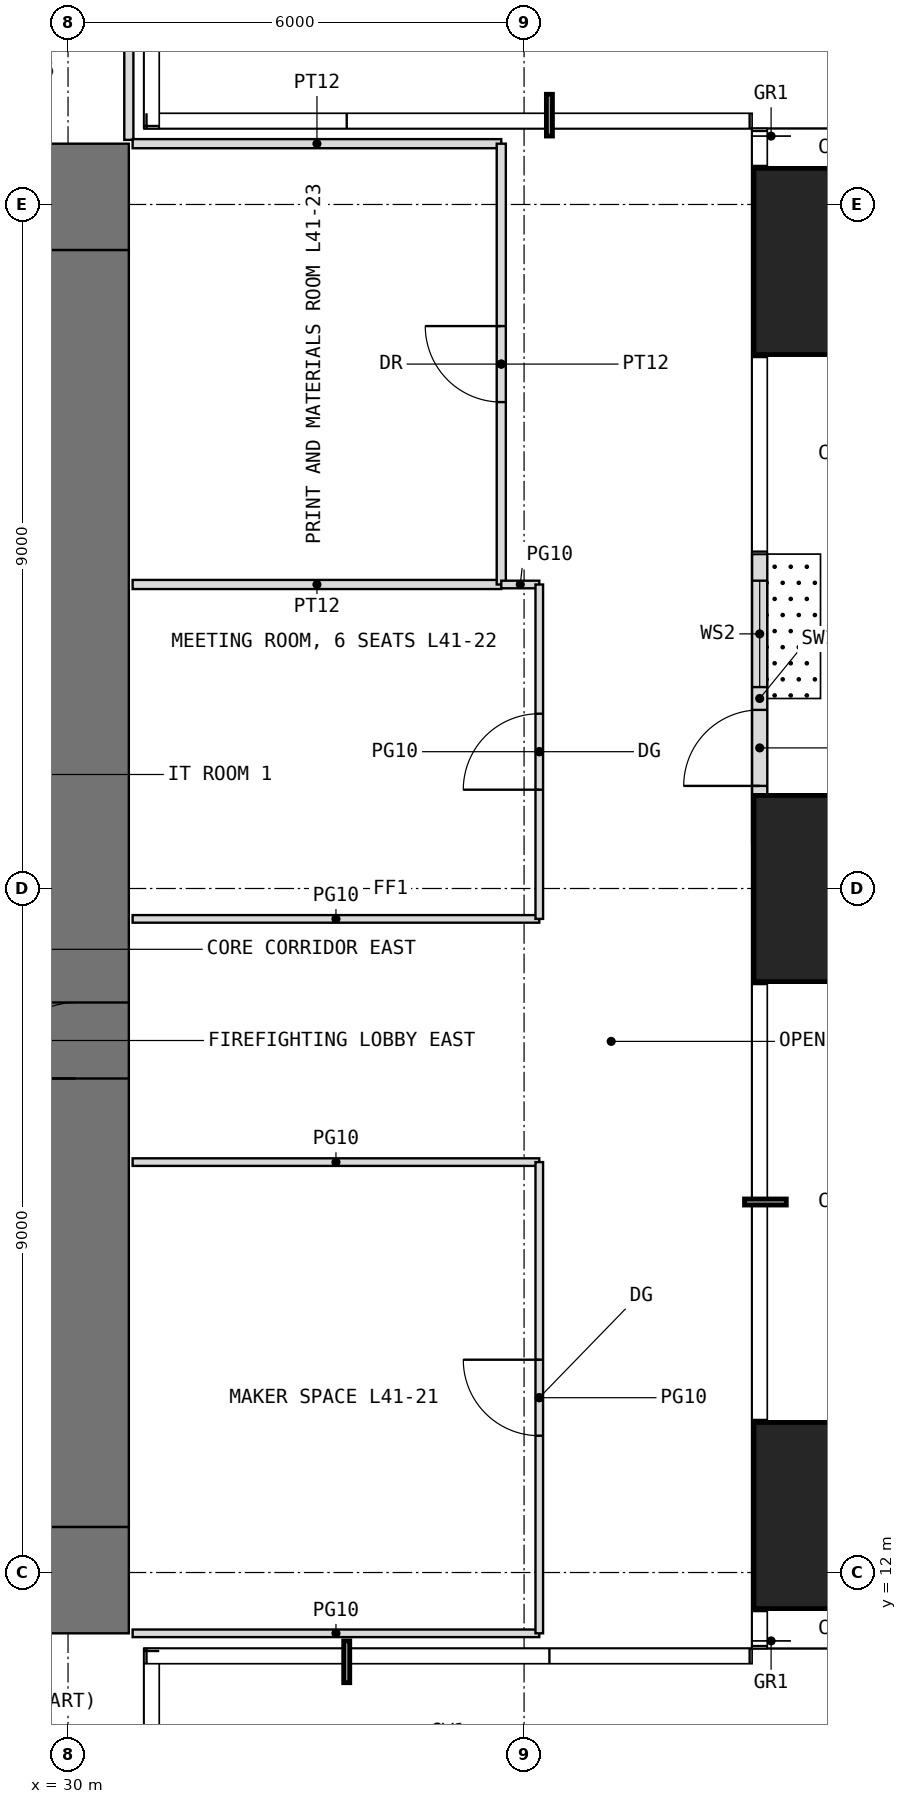
"""IFC4 building model, lengths in metres.
Left out: names, types, materials, properties, quantities, classifications, styles, units other than length and angle.
Written with IfcOpenShell. Run it as: python <this file> out.ifc"""

import sys

from ifc_helpers import new_model, si_unit, direction, frame, frame_2d, origin, origin_2d, place, context, subcontext, project, spatial, rectangle, extrude, element, fill, save


model = new_model("IFC4")
c1 = context("Model", 3, precision=1e-05, world=origin(), true_north=direction((0.0, 1.0)))
c2 = subcontext(c1, "Body", "Model", "MODEL_VIEW")
j1 = project(units=[si_unit("LENGTHUNIT", "METRE"), si_unit("PLANEANGLEUNIT", "RADIAN")], contexts=[c1])
p1 = place(None, origin())
s1 = spatial("IfcSite", under=j1, at=p1, CompositionType="ELEMENT")
p2 = place(p1, origin())
s2 = spatial("IfcBuilding", under=s1, at=p2, CompositionType="ELEMENT")
p3 = place(p2, frame((0.0, 0.0, 174.5)))
s3 = spatial("IfcBuildingStorey", under=s2, at=p3, CompositionType="ELEMENT", Elevation=174.5)
for number, where, z_axis, x_axis in (
    (1, (40.25, 12.75, 0.0), (0.0, 0.0, 1.0), (1.0, 0.0, 0.0)),
    (2, (40.25, 21.0, 0.0), (0.0, 0.0, 1.0), (1.0, 0.0, 0.0)),
    (3, (40.25, 29.25, 0.0), (0.0, 0.0, 1.0), (1.0, 0.0, 0.0)),
):
    element("IfcColumn", number, at=place(p3, frame(where, z_axis=z_axis, x_axis=x_axis)), inside=s3, PredefinedType="COLUMN", context=c2, shape_type="SweptSolid", body=[
        extrude(rectangle(XDim=2.45, YDim=2.45, at=origin_2d()), origin(), (0.0, 0.0, 1.0), 4.0),
    ])
p4 = place(p3, frame((39.1, 21.6, 0.0), z_axis=(0.0, 0.0, 1.0), x_axis=(0.0, 1.0, 0.0)))
e4 = element("IfcWall", 4, at=p4, inside=s3, PredefinedType="USERDEFINED", context=c2, shape_type="SweptSolid", body=[
    extrude(rectangle(XDim=3.8, YDim=0.2, at=frame_2d((1.9, 0.0))), origin(), (0.0, 0.0, 1.0), 3.75),
])
p5 = place(p4, frame((0.75, 0.0, 0.0)))
e5 = element("IfcOpeningElement", 5, at=p5, cuts=e4, PredefinedType="OPENING", context=c2, shape_type="SweptSolid", body=[
    extrude(rectangle(XDim=1.0, YDim=2.4, at=frame_2d((0.5, 1.2))), frame((0.0, 0.11, 0.0), z_axis=(0.0, -1.0, 0.0), x_axis=(1.0, 0.0, 0.0)), (0.0, 0.0, 1.0), 0.22),
])
p6 = place(p4, frame((2.05, 0.0, 0.3)))
e6 = element("IfcOpeningElement", 6, at=p6, cuts=e4, PredefinedType="OPENING", context=c2, shape_type="SweptSolid", body=[
    extrude(rectangle(XDim=1.4, YDim=2.7, at=frame_2d((0.7, 1.35))), frame((0.0, 0.11, 0.0), z_axis=(0.0, -1.0, 0.0), x_axis=(1.0, 0.0, 0.0)), (0.0, 0.0, 1.0), 0.22),
])
p7 = place(p3, frame((11.2, 11.9, -0.05), z_axis=(0.0, 0.0, 1.0), x_axis=(1.0, 0.0, 0.0)))
e7 = element("IfcWall", 7, at=p7, inside=s3, PredefinedType="SHEAR", context=c2, shape_type="SweptSolid", body=[
    extrude(rectangle(XDim=19.6, YDim=1.4, at=frame_2d((9.8, 0.0))), origin(), (0.0, 0.0, 1.0), 4.0),
])
p8 = place(p7, frame((8.8, 0.0, 0.05)))
e8 = element("IfcOpeningElement", 8, at=p8, cuts=e7, PredefinedType="OPENING", context=c2, shape_type="SweptSolid", body=[
    extrude(rectangle(XDim=2.0, YDim=2.2, at=frame_2d((1.0, 1.1))), frame((0.0, 0.71, 0.0), z_axis=(0.0, -1.0, 0.0), x_axis=(1.0, 0.0, 0.0)), (0.0, 0.0, 1.0), 1.42),
])
p9 = place(p3, frame((11.2, 30.1, -0.05), z_axis=(0.0, 0.0, 1.0), x_axis=(1.0, 0.0, 0.0)))
e9 = element("IfcWall", 9, at=p9, inside=s3, PredefinedType="SHEAR", context=c2, shape_type="SweptSolid", body=[
    extrude(rectangle(XDim=19.6, YDim=1.4, at=frame_2d((9.8, 0.0))), origin(), (0.0, 0.0, 1.0), 4.0),
])
p10 = place(p9, frame((8.8, 0.0, 0.05)))
e10 = element("IfcOpeningElement", 10, at=p10, cuts=e9, PredefinedType="OPENING", context=c2, shape_type="SweptSolid", body=[
    extrude(rectangle(XDim=2.0, YDim=2.2, at=frame_2d((1.0, 1.1))), frame((0.0, 0.71, 0.0), z_axis=(0.0, -1.0, 0.0), x_axis=(1.0, 0.0, 0.0)), (0.0, 0.0, 1.0), 1.42),
])
p11 = place(p3, frame((30.1, 12.6, -0.05), z_axis=(0.0, 0.0, 1.0), x_axis=(0.0, 1.0, 0.0)))
e11 = element("IfcWall", 11, at=p11, inside=s3, PredefinedType="SHEAR", context=c2, shape_type="SweptSolid", body=[
    extrude(rectangle(XDim=16.8, YDim=1.4, at=frame_2d((8.4, 0.0))), origin(), (0.0, 0.0, 1.0), 4.0),
])
p12 = place(p11, frame((5.9, 0.0, 0.05)))
e12 = element("IfcOpeningElement", 12, at=p12, cuts=e11, PredefinedType="OPENING", context=c2, shape_type="SweptSolid", body=[
    extrude(rectangle(XDim=1.0, YDim=2.2, at=frame_2d((0.5, 1.1))), frame((0.0, 0.71, 0.0), z_axis=(0.0, -1.0, 0.0), x_axis=(1.0, 0.0, 0.0)), (0.0, 0.0, 1.0), 1.42),
])
p13 = place(p3, frame((30.8, 30.85, 0.0), z_axis=(0.0, 0.0, 1.0), x_axis=(0.0, 1.0, 0.0)))
e13 = element("IfcWall", 13, at=p13, inside=s3, PredefinedType="PARTITIONING", context=c2, shape_type="SweptSolid", body=[
    extrude(rectangle(XDim=2.45, YDim=0.12, at=frame_2d((1.225, 0.0))), origin(), (0.0, 0.0, 1.0), 3.75),
])
for number, where, z_axis, x_axis in (
    (14, (30.85, 11.2, 0.0), (0.0, 0.0, 1.0), (1.0, 0.0, 0.0)),
    (15, (30.85, 17.4, 0.0), (0.0, 0.0, 1.0), (1.0, 0.0, 0.0)),
    (16, (30.85, 20.6, 0.0), (0.0, 0.0, 1.0), (1.0, 0.0, 0.0)),
):
    element("IfcWall", number, at=place(p3, frame(where, z_axis=z_axis, x_axis=x_axis)), inside=s3, PredefinedType="PARTITIONING", context=c2, shape_type="SweptSolid", body=[
        extrude(rectangle(XDim=5.35, YDim=0.1, at=frame_2d((2.675, 0.0))), origin(), (0.0, 0.0, 1.0), 3.75),
    ])
for number, where, z_axis, x_axis in (
    (17, (30.85, 25.0, 0.0), (0.0, 0.0, 1.0), (1.0, 0.0, 0.0)),
    (18, (30.85, 30.8, 0.0), (0.0, 0.0, 1.0), (1.0, 0.0, 0.0)),
):
    element("IfcWall", number, at=place(p3, frame(where, z_axis=z_axis, x_axis=x_axis)), inside=s3, PredefinedType="PARTITIONING", context=c2, shape_type="SweptSolid", body=[
        extrude(rectangle(XDim=4.85, YDim=0.12, at=frame_2d((2.425, 0.0))), origin(), (0.0, 0.0, 1.0), 3.75),
    ])
p14 = place(p3, frame((35.7, 25.0, 0.0), z_axis=(0.0, 0.0, 1.0), x_axis=(0.0, 1.0, 0.0)))
e19 = element("IfcWall", 19, at=p14, inside=s3, PredefinedType="PARTITIONING", context=c2, shape_type="SweptSolid", body=[
    extrude(rectangle(XDim=5.8, YDim=0.12, at=frame_2d((2.9, 0.0))), origin(), (0.0, 0.0, 1.0), 3.75),
])
p15 = place(p14, frame((2.4, 0.0, 0.0)))
e20 = element("IfcOpeningElement", 20, at=p15, cuts=e19, PredefinedType="OPENING", context=c2, shape_type="SweptSolid", body=[
    extrude(rectangle(XDim=1.0, YDim=2.2, at=frame_2d((0.5, 1.1))), frame((0.0, 0.07, 0.0), z_axis=(0.0, -1.0, 0.0), x_axis=(1.0, 0.0, 0.0)), (0.0, 0.0, 1.0), 0.14),
])
p16 = place(p3, frame((35.7, 25.0, 0.0), z_axis=(0.0, 0.0, 1.0), x_axis=(1.0, 0.0, 0.0)))
e21 = element("IfcWall", 21, at=p16, inside=s3, PredefinedType="PARTITIONING", context=c2, shape_type="SweptSolid", body=[
    extrude(rectangle(XDim=0.5, YDim=0.1, at=frame_2d((0.25, 0.0))), origin(), (0.0, 0.0, 1.0), 3.75),
])
p17 = place(p3, frame((36.2, 11.2, 0.0), z_axis=(0.0, 0.0, 1.0), x_axis=(0.0, 1.0, 0.0)))
e22 = element("IfcWall", 22, at=p17, inside=s3, PredefinedType="PARTITIONING", context=c2, shape_type="SweptSolid", body=[
    extrude(rectangle(XDim=6.2, YDim=0.1, at=frame_2d((3.1, 0.0))), origin(), (0.0, 0.0, 1.0), 3.75),
])
p18 = place(p17, frame((2.6, 0.0, 0.0)))
e23 = element("IfcOpeningElement", 23, at=p18, cuts=e22, PredefinedType="OPENING", context=c2, shape_type="SweptSolid", body=[
    extrude(rectangle(XDim=1.0, YDim=2.4, at=frame_2d((0.5, 1.2))), frame((0.0, 0.06, 0.0), z_axis=(0.0, -1.0, 0.0), x_axis=(1.0, 0.0, 0.0)), (0.0, 0.0, 1.0), 0.12),
])
p19 = place(p3, frame((36.2, 20.6, 0.0), z_axis=(0.0, 0.0, 1.0), x_axis=(0.0, 1.0, 0.0)))
e24 = element("IfcWall", 24, at=p19, inside=s3, PredefinedType="PARTITIONING", context=c2, shape_type="SweptSolid", body=[
    extrude(rectangle(XDim=4.4, YDim=0.1, at=frame_2d((2.2, 0.0))), origin(), (0.0, 0.0, 1.0), 3.75),
])
p20 = place(p19, frame((1.7, 0.0, 0.0)))
e25 = element("IfcOpeningElement", 25, at=p20, cuts=e24, PredefinedType="OPENING", context=c2, shape_type="SweptSolid", body=[
    extrude(rectangle(XDim=1.0, YDim=2.4, at=frame_2d((0.5, 1.2))), frame((0.0, 0.06, 0.0), z_axis=(0.0, -1.0, 0.0), x_axis=(1.0, 0.0, 0.0)), (0.0, 0.0, 1.0), 0.12),
])
p21 = place(p5, origin())
e26 = element("IfcDoor", 26, at=p21, inside=s3, OperationType="SINGLE_SWING_LEFT", PredefinedType="DOOR", context=c2, shape_type="SweptSolid", body=[
    extrude(rectangle(XDim=1.0, YDim=2.4, at=frame_2d((0.5, 1.2))), frame((0.0, 0.025, 0.0), z_axis=(0.0, -1.0, 0.0), x_axis=(1.0, 0.0, 0.0)), (0.0, 0.0, 1.0), 0.05),
])
fill(e5, e26)
p22 = place(p6, origin())
e27 = element("IfcWindow", 27, at=p22, inside=s3, PartitioningType="SINGLE_PANEL", PredefinedType="WINDOW", context=c2, shape_type="SweptSolid", body=[
    extrude(rectangle(XDim=1.4, YDim=2.7, at=frame_2d((0.7, 1.35))), frame((0.0, 0.03, 0.0), z_axis=(0.0, -1.0, 0.0), x_axis=(1.0, 0.0, 0.0)), (0.0, 0.0, 1.0), 0.06),
])
fill(e6, e27)
p23 = place(p12, origin())
e28 = element("IfcDoor", 28, at=p23, inside=s3, OperationType="SINGLE_SWING_LEFT", PredefinedType="DOOR", context=c2, shape_type="SweptSolid", body=[
    extrude(rectangle(XDim=1.0, YDim=2.2, at=frame_2d((0.5, 1.1))), frame((0.0, 0.025, 0.0), z_axis=(0.0, -1.0, 0.0), x_axis=(1.0, 0.0, 0.0)), (0.0, 0.0, 1.0), 0.05),
])
fill(e12, e28)
p24 = place(p18, origin())
e29 = element("IfcDoor", 29, at=p24, inside=s3, OperationType="SINGLE_SWING_RIGHT", PredefinedType="DOOR", context=c2, shape_type="SweptSolid", body=[
    extrude(rectangle(XDim=1.0, YDim=2.4, at=frame_2d((0.5, 1.2))), frame((0.0, 0.025, 0.0), z_axis=(0.0, -1.0, 0.0), x_axis=(1.0, 0.0, 0.0)), (0.0, 0.0, 1.0), 0.05),
])
fill(e23, e29)
p25 = place(p20, origin())
e30 = element("IfcDoor", 30, at=p25, inside=s3, OperationType="SINGLE_SWING_LEFT", PredefinedType="DOOR", context=c2, shape_type="SweptSolid", body=[
    extrude(rectangle(XDim=1.0, YDim=2.4, at=frame_2d((0.5, 1.2))), frame((0.0, 0.025, 0.0), z_axis=(0.0, -1.0, 0.0), x_axis=(1.0, 0.0, 0.0)), (0.0, 0.0, 1.0), 0.05),
])
fill(e25, e30)
p26 = place(p15, origin())
e31 = element("IfcDoor", 31, at=p26, inside=s3, OperationType="SINGLE_SWING_RIGHT", PredefinedType="DOOR", context=c2, shape_type="SweptSolid", body=[
    extrude(rectangle(XDim=1.0, YDim=2.2, at=frame_2d((0.5, 1.1))), frame((0.0, 0.025, 0.0), z_axis=(0.0, -1.0, 0.0), x_axis=(1.0, 0.0, 0.0)), (0.0, 0.0, 1.0), 0.05),
])
fill(e20, e31)
save(model, sys.argv[1])
